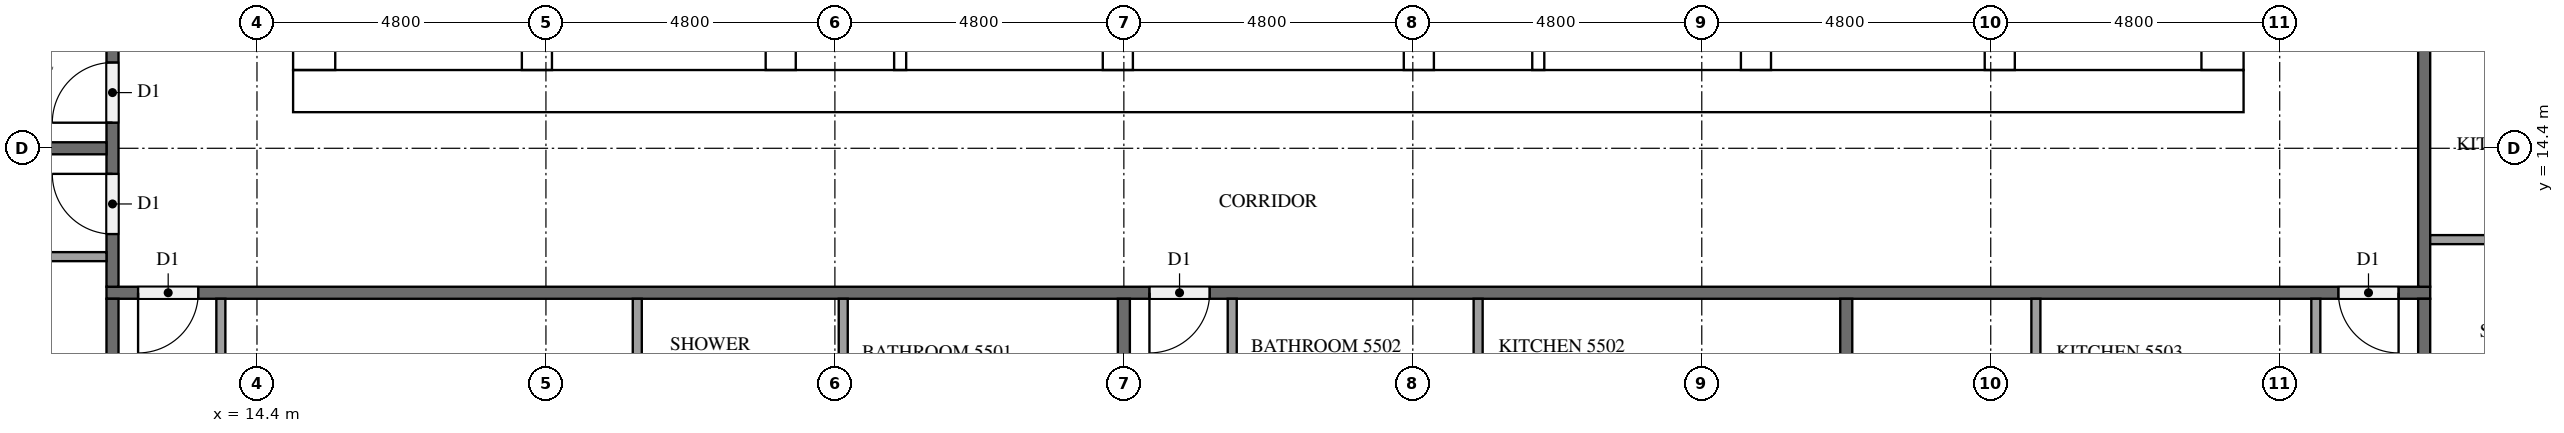
"""IFC4 building model, lengths in metres.
Left out: names, types, materials, properties, quantities, classifications, styles, units other than length and angle.
Written with IfcOpenShell. Run it as: python <this file> out.ifc"""

import sys

from ifc_helpers import new_model, si_unit, direction, frame, frame_2d, origin, place, context, subcontext, project, spatial, rectangle, extrude, element, fill, save


model = new_model("IFC4")
c1 = context("Model", 3, precision=1e-05, world=origin(), true_north=direction((0.0, 1.0)))
c2 = subcontext(c1, "Body", "Model", "MODEL_VIEW")
j1 = project(units=[si_unit("LENGTHUNIT", "METRE"), si_unit("PLANEANGLEUNIT", "RADIAN")], contexts=[c1])
p1 = place(None, origin())
s1 = spatial("IfcSite", under=j1, at=p1, CompositionType="ELEMENT")
p2 = place(p1, origin())
s2 = spatial("IfcBuilding", under=s1, at=p2, CompositionType="ELEMENT")
p3 = place(p2, frame((0.0, 0.0, 212.3)))
s3 = spatial("IfcBuildingStorey", under=s2, at=p3, CompositionType="ELEMENT", Elevation=212.3)
p4 = place(p3, frame((15.0, 15.35, 0.0), z_axis=(0.0, 0.0, 1.0), x_axis=(1.0, 0.0, 0.0)))
e1 = element("IfcWall", 1, at=p4, inside=s3, PredefinedType="SHEAR", context=c2, shape_type="SweptSolid", body=[
    extrude(rectangle(XDim=32.4, YDim=0.7, at=frame_2d((16.2, 0.0))), origin(), (0.0, 0.0, 1.0), 3.2),
])
p5 = place(p4, frame((15.3, 0.0, 0.0)))
e2 = element("IfcOpeningElement", 2, at=p5, cuts=e1, PredefinedType="OPENING", context=c2, shape_type="SweptSolid", body=[
    extrude(rectangle(XDim=1.8, YDim=2.1, at=frame_2d((0.9, 1.05))), frame((0.0, 0.36, 0.0), z_axis=(0.0, -1.0, 0.0), x_axis=(1.0, 0.0, 0.0)), (0.0, 0.0, 1.0), 0.72),
])
p6 = place(p3, frame((15.35, 15.7, 0.0), z_axis=(0.0, 0.0, 1.0), x_axis=(0.0, 1.0, 0.0)))
e3 = element("IfcWall", 3, at=p6, inside=s3, PredefinedType="SHEAR", context=c2, shape_type="SweptSolid", body=[
    extrude(rectangle(XDim=21.4, YDim=0.7, at=frame_2d((10.7, 0.0))), origin(), (0.0, 0.0, 1.0), 3.2),
])
p7 = place(p6, frame((5.06, 0.0, 0.0)))
e4 = element("IfcOpeningElement", 4, at=p7, cuts=e3, PredefinedType="OPENING", context=c2, shape_type="SweptSolid", body=[
    extrude(rectangle(XDim=1.2, YDim=2.1, at=frame_2d((0.6, 1.05))), frame((0.0, 0.36, 0.0), z_axis=(0.0, -1.0, 0.0), x_axis=(1.0, 0.0, 0.0)), (0.0, 0.0, 1.0), 0.72),
])
p8 = place(p3, frame((47.05, 15.7, 0.0), z_axis=(0.0, 0.0, 1.0), x_axis=(0.0, 1.0, 0.0)))
e5 = element("IfcWall", 5, at=p8, inside=s3, PredefinedType="SHEAR", context=c2, shape_type="SweptSolid", body=[
    extrude(rectangle(XDim=21.4, YDim=0.7, at=frame_2d((10.7, 0.0))), origin(), (0.0, 0.0, 1.0), 3.2),
])
p9 = place(p8, frame((10.4, 0.0, 0.0)))
e6 = element("IfcOpeningElement", 6, at=p9, cuts=e5, PredefinedType="OPENING", context=c2, shape_type="SweptSolid", body=[
    extrude(rectangle(XDim=1.2, YDim=2.1, at=frame_2d((0.6, 1.05))), frame((0.0, 0.36, 0.0), z_axis=(0.0, -1.0, 0.0), x_axis=(1.0, 0.0, 0.0)), (0.0, 0.0, 1.0), 0.72),
])
p10 = place(p3, frame((19.05, 15.7, 0.0), z_axis=(0.0, 0.0, 1.0), x_axis=(0.0, 1.0, 0.0)))
e7 = element("IfcWall", 7, at=p10, inside=s3, PredefinedType="SHEAR", context=c2, shape_type="SweptSolid", body=[
    extrude(rectangle(XDim=15.3, YDim=0.5, at=frame_2d((7.65, 0.0))), origin(), (0.0, 0.0, 1.0), 3.2),
])
p11 = place(p10, frame((9.75, 0.0, 0.0)))
e8 = element("IfcOpeningElement", 8, at=p11, cuts=e7, PredefinedType="OPENING", context=c2, shape_type="SweptSolid", body=[
    extrude(rectangle(XDim=1.1, YDim=2.1, at=frame_2d((0.55, 1.05))), frame((0.0, 0.26, 0.0), z_axis=(0.0, -1.0, 0.0), x_axis=(1.0, 0.0, 0.0)), (0.0, 0.0, 1.0), 0.52),
])
p12 = place(p10, frame((13.25, 0.0, 0.0)))
e9 = element("IfcOpeningElement", 9, at=p12, cuts=e7, PredefinedType="OPENING", context=c2, shape_type="SweptSolid", body=[
    extrude(rectangle(XDim=1.1, YDim=2.1, at=frame_2d((0.55, 1.05))), frame((0.0, 0.26, 0.0), z_axis=(0.0, -1.0, 0.0), x_axis=(1.0, 0.0, 0.0)), (0.0, 0.0, 1.0), 0.52),
])
p13 = place(p10, frame((0.5, 0.0, 0.0)))
e10 = element("IfcOpeningElement", 10, at=p13, cuts=e7, PredefinedType="OPENING", context=c2, shape_type="SweptSolid", body=[
    extrude(rectangle(XDim=1.2, YDim=2.1, at=frame_2d((0.6, 1.05))), frame((0.0, 0.26, 0.0), z_axis=(0.0, -1.0, 0.0), x_axis=(1.0, 0.0, 0.0)), (0.0, 0.0, 1.0), 0.52),
])
p14 = place(p3, frame((23.1, 15.7, 0.0), z_axis=(0.0, 0.0, 1.0), x_axis=(0.0, 1.0, 0.0)))
e11 = element("IfcWall", 11, at=p14, inside=s3, PredefinedType="SHEAR", context=c2, shape_type="SweptSolid", body=[
    extrude(rectangle(XDim=21.4, YDim=0.5, at=frame_2d((10.7, 0.0))), origin(), (0.0, 0.0, 1.0), 3.2),
])
p15 = place(p3, frame((39.3, 15.7, 0.0), z_axis=(0.0, 0.0, 1.0), x_axis=(0.0, 1.0, 0.0)))
e12 = element("IfcWall", 12, at=p15, inside=s3, PredefinedType="SHEAR", context=c2, shape_type="SweptSolid", body=[
    extrude(rectangle(XDim=8.55, YDim=0.5, at=frame_2d((4.275, 0.0))), origin(), (0.0, 0.0, 1.0), 3.2),
])
p16 = place(p3, frame((43.35, 15.7, 0.0), z_axis=(0.0, 0.0, 1.0), x_axis=(0.0, 1.0, 0.0)))
e13 = element("IfcWall", 13, at=p16, inside=s3, PredefinedType="SHEAR", context=c2, shape_type="SweptSolid", body=[
    extrude(rectangle(XDim=8.55, YDim=0.5, at=frame_2d((4.275, 0.0))), origin(), (0.0, 0.0, 1.0), 3.2),
])
p17 = place(p16, frame((0.5, 0.0, 0.0)))
e14 = element("IfcOpeningElement", 14, at=p17, cuts=e13, PredefinedType="OPENING", context=c2, shape_type="SweptSolid", body=[
    extrude(rectangle(XDim=1.2, YDim=2.1, at=frame_2d((0.6, 1.05))), frame((0.0, 0.26, 0.0), z_axis=(0.0, -1.0, 0.0), x_axis=(1.0, 0.0, 0.0)), (0.0, 0.0, 1.0), 0.52),
])
for number, where, z_axis, x_axis in (
    (15, (28.7, 15.7, 0.0), (0.0, 0.0, 1.0), (0.0, 1.0, 0.0)),
    (16, (33.7, 15.7, 0.0), (0.0, 0.0, 1.0), (0.0, 1.0, 0.0)),
):
    element("IfcWall", number, at=place(p3, frame(where, z_axis=z_axis, x_axis=x_axis)), inside=s3, PredefinedType="SHEAR", context=c2, shape_type="SweptSolid", body=[
        extrude(rectangle(XDim=2.8, YDim=0.5, at=frame_2d((1.4, 0.0))), origin(), (0.0, 0.0, 1.0), 3.2),
    ])
for number, where, z_axis, x_axis in (
    (17, (25.084, 15.7, 0.0), (0.0, 0.0, 1.0), (0.0, 1.0, 0.0)),
    (18, (35.684, 15.7, 0.0), (0.0, 0.0, 1.0), (0.0, 1.0, 0.0)),
):
    element("IfcWall", number, at=place(p3, frame(where, z_axis=z_axis, x_axis=x_axis)), inside=s3, PredefinedType="PARTITIONING", context=c2, shape_type="SweptSolid", body=[
        extrude(rectangle(XDim=2.8, YDim=0.2, at=frame_2d((1.4, 0.0))), origin(), (0.0, 0.0, 1.0), 3.2),
    ])
p18 = place(p3, frame((50.5, 12.0, 0.0), z_axis=(0.0, 0.0, 1.0), x_axis=(-1.0, 0.0, 0.0)))
e19 = element("IfcWall", 19, at=p18, inside=s3, PredefinedType="PARTITIONING", context=c2, shape_type="SweptSolid", body=[
    extrude(rectangle(XDim=38.6, YDim=0.2, at=frame_2d((19.3, 0.0))), origin(), (0.0, 0.0, 1.0), 3.2),
])
p19 = place(p18, frame((37.075, 0.0, 0.0)))
e20 = element("IfcOpeningElement", 20, at=p19, cuts=e19, PredefinedType="OPENING", context=c2, shape_type="SweptSolid", body=[
    extrude(rectangle(XDim=1.0, YDim=2.1, at=frame_2d((0.5, 1.05))), frame((0.0, 0.11, 0.0), z_axis=(0.0, -1.0, 0.0), x_axis=(1.0, 0.0, 0.0)), (0.0, 0.0, 1.0), 0.22),
])
p20 = place(p18, frame((20.275, 0.0, 0.0)))
e21 = element("IfcOpeningElement", 21, at=p20, cuts=e19, PredefinedType="OPENING", context=c2, shape_type="SweptSolid", body=[
    extrude(rectangle(XDim=1.0, YDim=2.1, at=frame_2d((0.5, 1.05))), frame((0.0, 0.11, 0.0), z_axis=(0.0, -1.0, 0.0), x_axis=(1.0, 0.0, 0.0)), (0.0, 0.0, 1.0), 0.22),
])
p21 = place(p18, frame((0.525, 0.0, 0.0)))
e22 = element("IfcOpeningElement", 22, at=p21, cuts=e19, PredefinedType="OPENING", context=c2, shape_type="SweptSolid", body=[
    extrude(rectangle(XDim=1.0, YDim=2.1, at=frame_2d((0.5, 1.05))), frame((0.0, 0.11, 0.0), z_axis=(0.0, -1.0, 0.0), x_axis=(1.0, 0.0, 0.0)), (0.0, 0.0, 1.0), 0.22),
])
p22 = place(p3, frame((50.4, 40.7, 0.0), z_axis=(0.0, 0.0, 1.0), x_axis=(0.0, -1.0, 0.0)))
e23 = element("IfcWall", 23, at=p22, inside=s3, PredefinedType="PARTITIONING", context=c2, shape_type="SweptSolid", body=[
    extrude(rectangle(XDim=28.6, YDim=0.2, at=frame_2d((14.3, 0.0))), origin(), (0.0, 0.0, 1.0), 3.2),
])
p23 = place(p22, frame((19.525, 0.0, 0.0)))
e24 = element("IfcOpeningElement", 24, at=p23, cuts=e23, PredefinedType="OPENING", context=c2, shape_type="SweptSolid", body=[
    extrude(rectangle(XDim=1.0, YDim=2.1, at=frame_2d((0.5, 1.05))), frame((0.0, 0.11, 0.0), z_axis=(0.0, -1.0, 0.0), x_axis=(1.0, 0.0, 0.0)), (0.0, 0.0, 1.0), 0.22),
])
p24 = place(p22, frame((7.525, 0.0, 0.0)))
e25 = element("IfcOpeningElement", 25, at=p24, cuts=e23, PredefinedType="OPENING", context=c2, shape_type="SweptSolid", body=[
    extrude(rectangle(XDim=1.0, YDim=2.1, at=frame_2d((0.5, 1.05))), frame((0.0, 0.11, 0.0), z_axis=(0.0, -1.0, 0.0), x_axis=(1.0, 0.0, 0.0)), (0.0, 0.0, 1.0), 0.22),
])
p25 = place(p22, frame((0.325, 0.0, 0.0)))
e26 = element("IfcOpeningElement", 26, at=p25, cuts=e23, PredefinedType="OPENING", context=c2, shape_type="SweptSolid", body=[
    extrude(rectangle(XDim=1.0, YDim=2.1, at=frame_2d((0.5, 1.05))), frame((0.0, 0.11, 0.0), z_axis=(0.0, -1.0, 0.0), x_axis=(1.0, 0.0, 0.0)), (0.0, 0.0, 1.0), 0.22),
])
p26 = place(p3, frame((12.0, 12.1, 0.0), z_axis=(0.0, 0.0, 1.0), x_axis=(0.0, 1.0, 0.0)))
e27 = element("IfcWall", 27, at=p26, inside=s3, PredefinedType="PARTITIONING", context=c2, shape_type="SweptSolid", body=[
    extrude(rectangle(XDim=28.6, YDim=0.2, at=frame_2d((14.3, 0.0))), origin(), (0.0, 0.0, 1.0), 3.2),
])
p27 = place(p26, frame((27.275, 0.0, 0.0)))
e28 = element("IfcOpeningElement", 28, at=p27, cuts=e27, PredefinedType="OPENING", context=c2, shape_type="SweptSolid", body=[
    extrude(rectangle(XDim=1.0, YDim=2.1, at=frame_2d((0.5, 1.05))), frame((0.0, 0.11, 0.0), z_axis=(0.0, -1.0, 0.0), x_axis=(1.0, 0.0, 0.0)), (0.0, 0.0, 1.0), 0.22),
])
p28 = place(p26, frame((12.325, 0.0, 0.0)))
e29 = element("IfcOpeningElement", 29, at=p28, cuts=e27, PredefinedType="OPENING", context=c2, shape_type="SweptSolid", body=[
    extrude(rectangle(XDim=1.0, YDim=2.1, at=frame_2d((0.5, 1.05))), frame((0.0, 0.11, 0.0), z_axis=(0.0, -1.0, 0.0), x_axis=(1.0, 0.0, 0.0)), (0.0, 0.0, 1.0), 0.22),
])
p29 = place(p26, frame((2.725, 0.0, 0.0)))
e30 = element("IfcOpeningElement", 30, at=p29, cuts=e27, PredefinedType="OPENING", context=c2, shape_type="SweptSolid", body=[
    extrude(rectangle(XDim=1.0, YDim=2.1, at=frame_2d((0.5, 1.05))), frame((0.0, 0.11, 0.0), z_axis=(0.0, -1.0, 0.0), x_axis=(1.0, 0.0, 0.0)), (0.0, 0.0, 1.0), 0.22),
])
p30 = place(p26, frame((0.875, 0.0, 0.0)))
e31 = element("IfcOpeningElement", 31, at=p30, cuts=e27, PredefinedType="OPENING", context=c2, shape_type="SweptSolid", body=[
    extrude(rectangle(XDim=1.0, YDim=2.1, at=frame_2d((0.5, 1.05))), frame((0.0, 0.11, 0.0), z_axis=(0.0, -1.0, 0.0), x_axis=(1.0, 0.0, 0.0)), (0.0, 0.0, 1.0), 0.22),
])
p31 = place(p3, frame((28.8, 11.9, 0.0), z_axis=(0.0, 0.0, 1.0), x_axis=(0.0, -1.0, 0.0)))
e32 = element("IfcWall", 32, at=p31, inside=s3, PredefinedType="PARTITIONING", context=c2, shape_type="SweptSolid", body=[
    extrude(rectangle(XDim=6.775, YDim=0.2, at=frame_2d((3.387, 0.0))), origin(), (0.0, 0.0, 1.0), 3.2),
])
for number, where, z_axis, x_axis in (
    (33, (12.0, 4.9, 0.0), (0.0, 0.0, 1.0), (0.0, 1.0, 0.0)),
    (34, (40.8, 11.9, 0.0), (0.0, 0.0, 1.0), (0.0, -1.0, 0.0)),
    (35, (50.4, 11.9, 0.0), (0.0, 0.0, 1.0), (0.0, -1.0, 0.0)),
    (36, (4.9, 14.4, 0.0), (0.0, 0.0, 1.0), (1.0, 0.0, 0.0)),
):
    element("IfcWall", number, at=place(p3, frame(where, z_axis=z_axis, x_axis=x_axis)), inside=s3, PredefinedType="PARTITIONING", context=c2, shape_type="SweptSolid", body=[
        extrude(rectangle(XDim=7.0, YDim=0.2, at=frame_2d((3.5, 0.0))), origin(), (0.0, 0.0, 1.0), 3.2),
    ])
for number, where, z_axis, x_axis in (
    (37, (20.717, 11.9, 0.0), (0.0, 0.0, 1.0), (0.0, -1.0, 0.0)),
    (38, (24.138, 11.9, 0.0), (0.0, 0.0, 1.0), (0.0, -1.0, 0.0)),
):
    element("IfcWall", number, at=place(p3, frame(where, z_axis=z_axis, x_axis=x_axis)), inside=s3, PredefinedType="PARTITIONING", context=c2, shape_type="SweptSolid", body=[
        extrude(rectangle(XDim=2.225, YDim=0.15, at=frame_2d((1.112, 0.0))), origin(), (0.0, 0.0, 1.0), 3.2),
    ])
p32 = place(p3, frame((13.8, 11.9, 0.0), z_axis=(0.0, 0.0, 1.0), x_axis=(0.0, -1.0, 0.0)))
e39 = element("IfcWall", 39, at=p32, inside=s3, PredefinedType="PARTITIONING", context=c2, shape_type="SweptSolid", body=[
    extrude(rectangle(XDim=2.375, YDim=0.15, at=frame_2d((1.188, 0.0))), origin(), (0.0, 0.0, 1.0), 3.2),
])
p33 = place(p3, frame((34.685, 11.9, 0.0), z_axis=(0.0, 0.0, 1.0), x_axis=(0.0, -1.0, 0.0)))
e40 = element("IfcWall", 40, at=p33, inside=s3, PredefinedType="PARTITIONING", context=c2, shape_type="SweptSolid", body=[
    extrude(rectangle(XDim=1.775, YDim=0.15, at=frame_2d((0.887, 0.0))), origin(), (0.0, 0.0, 1.0), 3.2),
])
p34 = place(p3, frame((30.6, 11.9, 0.0), z_axis=(0.0, 0.0, 1.0), x_axis=(0.0, -1.0, 0.0)))
e41 = element("IfcWall", 41, at=p34, inside=s3, PredefinedType="PARTITIONING", context=c2, shape_type="SweptSolid", body=[
    extrude(rectangle(XDim=1.925, YDim=0.15, at=frame_2d((0.962, 0.0))), origin(), (0.0, 0.0, 1.0), 3.2),
])
p35 = place(p3, frame((43.95, 11.9, 0.0), z_axis=(0.0, 0.0, 1.0), x_axis=(0.0, -1.0, 0.0)))
e42 = element("IfcWall", 42, at=p35, inside=s3, PredefinedType="PARTITIONING", context=c2, shape_type="SweptSolid", body=[
    extrude(rectangle(XDim=2.225, YDim=0.15, at=frame_2d((1.112, 0.0))), origin(), (0.0, 0.0, 1.0), 3.2),
])
p36 = place(p3, frame((48.6, 11.9, 0.0), z_axis=(0.0, 0.0, 1.0), x_axis=(0.0, -1.0, 0.0)))
e43 = element("IfcWall", 43, at=p36, inside=s3, PredefinedType="PARTITIONING", context=c2, shape_type="SweptSolid", body=[
    extrude(rectangle(XDim=2.375, YDim=0.15, at=frame_2d((1.188, 0.0))), origin(), (0.0, 0.0, 1.0), 3.2),
])
p37 = place(p3, frame((50.5, 12.883, 0.0), z_axis=(0.0, 0.0, 1.0), x_axis=(1.0, 0.0, 0.0)))
e44 = element("IfcWall", 44, at=p37, inside=s3, PredefinedType="PARTITIONING", context=c2, shape_type="SweptSolid", body=[
    extrude(rectangle(XDim=2.975, YDim=0.15, at=frame_2d((1.488, 0.0))), origin(), (0.0, 0.0, 1.0), 3.2),
])
p38 = place(p3, frame((11.9, 12.6, 0.0), z_axis=(0.0, 0.0, 1.0), x_axis=(-1.0, 0.0, 0.0)))
e45 = element("IfcWall", 45, at=p38, inside=s3, PredefinedType="PARTITIONING", context=c2, shape_type="SweptSolid", body=[
    extrude(rectangle(XDim=2.225, YDim=0.15, at=frame_2d((1.112, 0.0))), origin(), (0.0, 0.0, 1.0), 3.2),
])
p39 = place(p5, frame((1.8, 0.0, 0.0), z_axis=(0.0, 0.0, 1.0), x_axis=(-1.0, 0.0, 0.0)))
e46 = element("IfcDoor", 46, at=p39, inside=s3, OperationType="DOUBLE_DOOR_SINGLE_SWING", PredefinedType="DOOR", context=c2, shape_type="SweptSolid", body=[
    extrude(rectangle(XDim=1.8, YDim=2.1, at=frame_2d((0.9, 1.05))), frame((0.0, 0.025, 0.0), z_axis=(0.0, -1.0, 0.0), x_axis=(1.0, 0.0, 0.0)), (0.0, 0.0, 1.0), 0.05),
])
fill(e2, e46)
p40 = place(p19, origin())
e47 = element("IfcDoor", 47, at=p40, inside=s3, OperationType="SINGLE_SWING_RIGHT", PredefinedType="DOOR", context=c2, shape_type="SweptSolid", body=[
    extrude(rectangle(XDim=1.0, YDim=2.1, at=frame_2d((0.5, 1.05))), frame((0.0, 0.025, 0.0), z_axis=(0.0, -1.0, 0.0), x_axis=(1.0, 0.0, 0.0)), (0.0, 0.0, 1.0), 0.05),
])
fill(e20, e47)
p41 = place(p20, origin())
e48 = element("IfcDoor", 48, at=p41, inside=s3, OperationType="SINGLE_SWING_RIGHT", PredefinedType="DOOR", context=c2, shape_type="SweptSolid", body=[
    extrude(rectangle(XDim=1.0, YDim=2.1, at=frame_2d((0.5, 1.05))), frame((0.0, 0.025, 0.0), z_axis=(0.0, -1.0, 0.0), x_axis=(1.0, 0.0, 0.0)), (0.0, 0.0, 1.0), 0.05),
])
fill(e21, e48)
p42 = place(p21, origin())
e49 = element("IfcDoor", 49, at=p42, inside=s3, OperationType="SINGLE_SWING_LEFT", PredefinedType="DOOR", context=c2, shape_type="SweptSolid", body=[
    extrude(rectangle(XDim=1.0, YDim=2.1, at=frame_2d((0.5, 1.05))), frame((0.0, 0.025, 0.0), z_axis=(0.0, -1.0, 0.0), x_axis=(1.0, 0.0, 0.0)), (0.0, 0.0, 1.0), 0.05),
])
fill(e22, e49)
p43 = place(p29, origin())
e50 = element("IfcDoor", 50, at=p43, inside=s3, OperationType="SINGLE_SWING_LEFT", PredefinedType="DOOR", context=c2, shape_type="SweptSolid", body=[
    extrude(rectangle(XDim=1.0, YDim=2.1, at=frame_2d((0.5, 1.05))), frame((0.0, 0.025, 0.0), z_axis=(0.0, -1.0, 0.0), x_axis=(1.0, 0.0, 0.0)), (0.0, 0.0, 1.0), 0.05),
])
fill(e30, e50)
p44 = place(p30, origin())
e51 = element("IfcDoor", 51, at=p44, inside=s3, OperationType="SINGLE_SWING_RIGHT", PredefinedType="DOOR", context=c2, shape_type="SweptSolid", body=[
    extrude(rectangle(XDim=1.0, YDim=2.1, at=frame_2d((0.5, 1.05))), frame((0.0, 0.025, 0.0), z_axis=(0.0, -1.0, 0.0), x_axis=(1.0, 0.0, 0.0)), (0.0, 0.0, 1.0), 0.05),
])
fill(e31, e51)
save(model, sys.argv[1])
